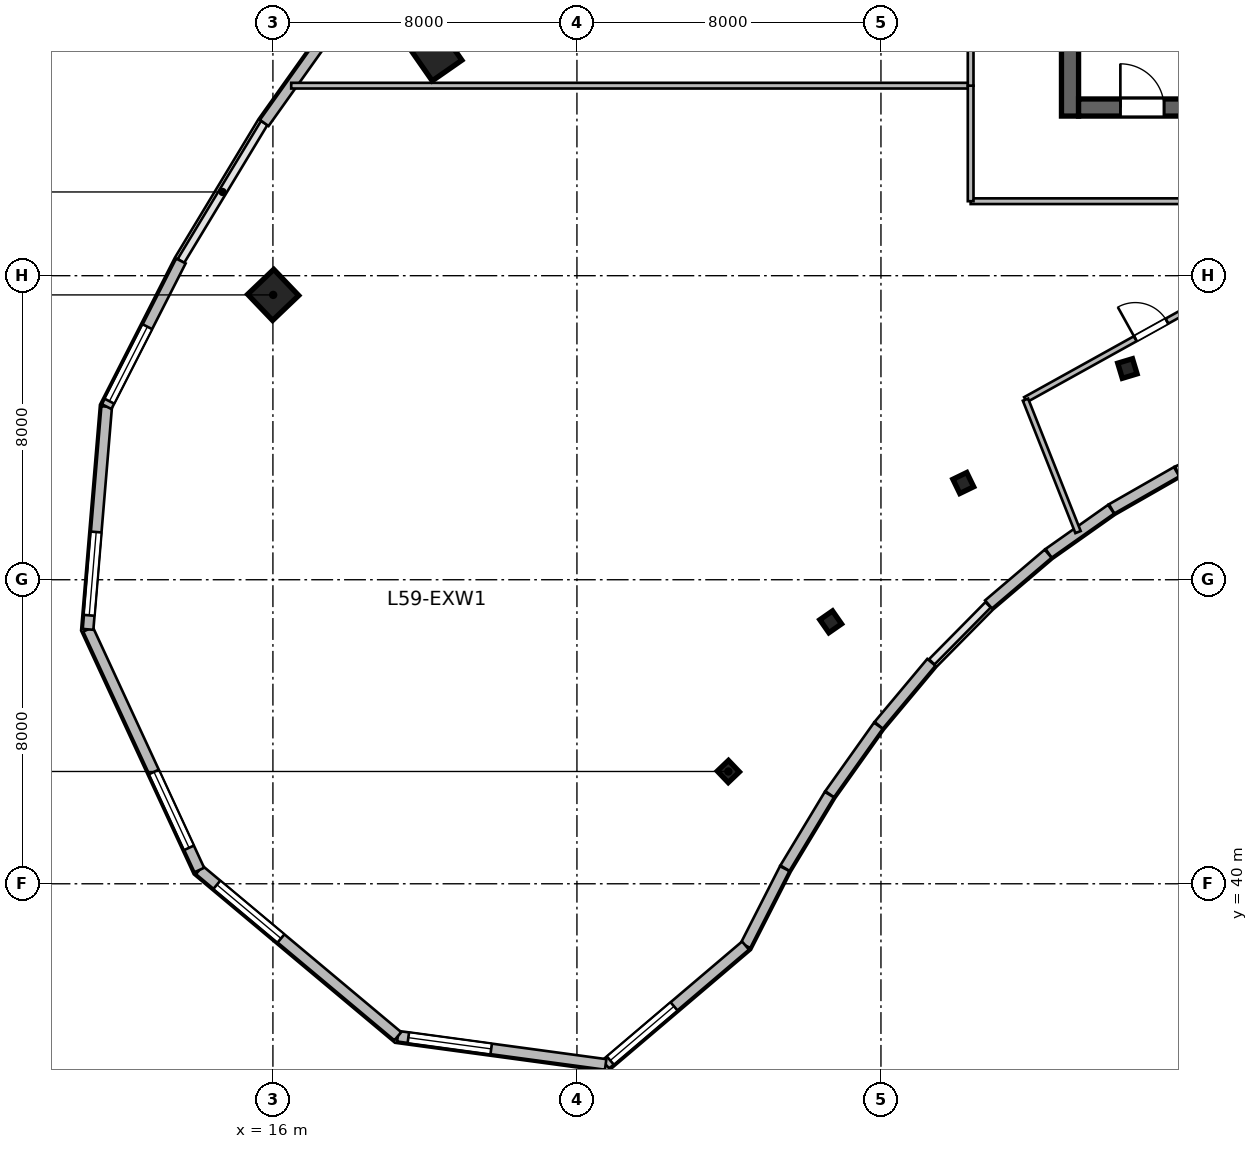
"""IFC4 building model, lengths in metres.
Left out: names, types, materials, properties, quantities, classifications, styles, units other than length and angle.
Written with IfcOpenShell. Run it as: python <this file> out.ifc"""

import sys

from ifc_helpers import new_model, si_unit, direction, frame, frame_2d, origin, origin_2d, place, context, subcontext, project, spatial, rectangle, i_section, extrude, source, transform, mapped, element, fill, save


model = new_model("IFC4")
c1 = context("Model", 3, precision=1e-05, world=origin(), true_north=direction((0.0, 1.0)))
c2 = subcontext(c1, "Body", "Model", "MODEL_VIEW")
j1 = project(units=[si_unit("LENGTHUNIT", "METRE"), si_unit("PLANEANGLEUNIT", "RADIAN")], contexts=[c1])
p1 = place(None, origin())
s1 = spatial("IfcSite", under=j1, at=p1, CompositionType="ELEMENT")
p2 = place(p1, origin())
s2 = spatial("IfcBuilding", under=s1, at=p2, CompositionType="ELEMENT")
p3 = place(p2, frame((0.0, 0.0, 243.0)))
s3 = spatial("IfcBuildingStorey", under=s2, at=p3, CompositionType="ELEMENT", Elevation=243.0)
m1 = source(origin(), c2, "Body", "SweptSolid", [
    extrude(rectangle(XDim=12.0, YDim=0.45, at=frame_2d((6.0, 0.0))), origin(), (0.0, 0.0, 1.0), 3.9),
])
p4 = place(p3, frame((36.975, 60.2, 0.0), z_axis=(0.0, 0.0, 1.0), x_axis=(0.0, 1.0, 0.0)))
e1 = element("IfcWall", 1, at=p4, inside=s3, PredefinedType="SHEAR", context=c2, shape_type="MappedRepresentation", body=[
    mapped(m1, transform((0.0, 0.0, 0.0), scale=1.0)),
])
m2 = source(origin(), c2, "Body", "SweptSolid", [
    extrude(rectangle(XDim=21.6, YDim=0.45, at=frame_2d((10.8, 0.0))), origin(), (0.0, 0.0, 1.0), 3.9),
])
p5 = place(p3, frame((37.2, 60.425, 0.0), z_axis=(0.0, 0.0, 1.0), x_axis=(1.0, 0.0, 0.0)))
e2 = element("IfcWall", 2, at=p5, inside=s3, PredefinedType="SHEAR", context=c2, shape_type="MappedRepresentation", body=[
    mapped(m2, transform((0.0, 0.0, 0.0), scale=1.0)),
])
p6 = place(p5, frame((1.1, 0.0, 0.0)))
e3 = element("IfcOpeningElement", 3, at=p6, cuts=e2, PredefinedType="OPENING", context=c2, shape_type="SweptSolid", body=[
    extrude(rectangle(XDim=1.15, YDim=2.15, at=frame_2d((0.575, 1.075))), frame((0.0, 0.235, 0.0), z_axis=(0.0, -1.0, 0.0), x_axis=(1.0, 0.0, 0.0)), (0.0, 0.0, 1.0), 0.47),
])
p7 = place(p5, frame((19.5, 0.0, 0.0)))
e4 = element("IfcOpeningElement", 4, at=p7, cuts=e2, PredefinedType="OPENING", context=c2, shape_type="SweptSolid", body=[
    extrude(rectangle(XDim=0.9, YDim=2.1, at=frame_2d((0.45, 1.05))), frame((0.0, 0.235, 0.0), z_axis=(0.0, -1.0, 0.0), x_axis=(1.0, 0.0, 0.0)), (0.0, 0.0, 1.0), 0.47),
])
p8 = place(p5, frame((12.02, 0.0, 0.0)))
e5 = element("IfcOpeningElement", 5, at=p8, cuts=e2, PredefinedType="OPENING", context=c2, shape_type="SweptSolid", body=[
    extrude(rectangle(XDim=1.6, YDim=2.15, at=frame_2d((0.8, 1.075))), frame((0.0, 0.235, 0.0), z_axis=(0.0, -1.0, 0.0), x_axis=(1.0, 0.0, 0.0)), (0.0, 0.0, 1.0), 0.47),
])
m3 = source(origin(), c2, "Body", "SweptSolid", [
    extrude(i_section(OverallWidth=0.406, OverallDepth=0.416, WebThickness=0.03, FlangeThickness=0.048, at=origin_2d()), origin(), (0.0, 0.0, 1.0), 3.9),
])
p9 = place(p3, frame((27.985, 42.955, 0.0), z_axis=(0.0, 0.0, 1.0), x_axis=(-0.690756218984, 0.723087716626, 0.0)))
e6 = element("IfcColumn", 6, at=p9, inside=s3, PredefinedType="COLUMN", context=c2, shape_type="MappedRepresentation", body=[
    mapped(m3, transform((0.0, 0.0, 0.0), scale=1.0)),
])
m4 = source(origin(), c2, "Body", "SweptSolid", [
    extrude(rectangle(XDim=0.95, YDim=0.95, at=origin_2d()), origin(), (0.0, 0.0, 1.0), 3.9),
])
p10 = place(p3, frame((16.007, 55.494, 0.0), z_axis=(0.0, 0.0, 1.0), x_axis=(-0.690756218984, 0.723087716626, 0.0)))
e7 = element("IfcColumn", 7, at=p10, inside=s3, PredefinedType="COLUMN", context=c2, shape_type="MappedRepresentation", body=[
    mapped(m4, transform((0.0, 0.0, 0.0), scale=1.0)),
])
p11 = place(p3, frame((30.677, 46.892, 0.0), z_axis=(0.0, 0.0, 1.0), x_axis=(-0.571143442153, 0.820850271661, 0.0)))
e8 = element("IfcColumn", 8, at=p11, inside=s3, PredefinedType="COLUMN", context=c2, shape_type="MappedRepresentation", body=[
    mapped(m3, transform((0.0, 0.0, 0.0), scale=1.0)),
])
p12 = place(p3, frame((20.311, 61.789, 0.0), z_axis=(0.0, 0.0, 1.0), x_axis=(-0.571143442153, 0.820850271661, 0.0)))
e9 = element("IfcColumn", 9, at=p12, inside=s3, PredefinedType="COLUMN", context=c2, shape_type="MappedRepresentation", body=[
    mapped(m4, transform((0.0, 0.0, 0.0), scale=1.0)),
])
for number, where, z_axis, x_axis in (
    (10, (34.166, 50.545, 0.0), (0.0, 0.0, 1.0), (-0.436, 0.9, 0.0)),
    (11, (38.485, 53.558, 0.0), (0.0, 0.0, 1.0), (-0.289, 0.957, 0.0)),
):
    element("IfcColumn", number, at=place(p3, frame(where, z_axis=z_axis, x_axis=x_axis)), inside=s3, PredefinedType="COLUMN", context=c2, shape_type="MappedRepresentation", body=[
        mapped(m3, transform((0.0, 0.0, 0.0), scale=1.0)),
    ])
m5 = source(origin(), c2, "Body", "SweptSolid", [
    extrude(rectangle(XDim=1.931, YDim=0.28, at=frame_2d((0.965, 0.0))), origin(), (0.0, 0.0, 1.0), 3.65),
])
p13 = place(p3, frame((41.557, 51.639, 0.0), z_axis=(0.0, 0.0, 1.0), x_axis=(-0.912681759743, -0.408671023481, 0.0)))
e12 = element("IfcWall", 12, at=p13, inside=s3, PredefinedType="SOLIDWALL", context=c2, shape_type="MappedRepresentation", body=[
    mapped(m5, transform((0.0, 0.0, 0.0), scale=1.0)),
])
m6 = source(origin(), c2, "Body", "SweptSolid", [
    extrude(rectangle(XDim=1.969, YDim=0.28, at=frame_2d((0.984, 0.0))), origin(), (0.0, 0.0, 1.0), 3.65),
])
p14 = place(p3, frame((39.779, 50.842, 0.0), z_axis=(0.0, 0.0, 1.0), x_axis=(-0.86797594681, -0.496606238139, 0.0)))
e13 = element("IfcWall", 13, at=p14, inside=s3, PredefinedType="SOLIDWALL", context=c2, shape_type="MappedRepresentation", body=[
    mapped(m6, transform((0.0, 0.0, 0.0), scale=1.0)),
])
m7 = source(origin(), c2, "Body", "SweptSolid", [
    extrude(rectangle(XDim=2.012, YDim=0.28, at=frame_2d((1.006, 0.0))), origin(), (0.0, 0.0, 1.0), 3.65),
])
p15 = place(p3, frame((38.055, 49.855, 0.0), z_axis=(0.0, 0.0, 1.0), x_axis=(-0.817008215805, -0.576626027255, 0.0)))
e14 = element("IfcWall", 14, at=p15, inside=s3, PredefinedType="SOLIDWALL", context=c2, shape_type="MappedRepresentation", body=[
    mapped(m7, transform((0.0, 0.0, 0.0), scale=1.0)),
])
m8 = source(origin(), c2, "Body", "SweptSolid", [
    extrude(rectangle(XDim=2.06, YDim=0.28, at=frame_2d((1.03, 0.0))), origin(), (0.0, 0.0, 1.0), 3.65),
])
p16 = place(p3, frame((36.399, 48.685, 0.0), z_axis=(0.0, 0.0, 1.0), x_axis=(-0.761494573969, -0.648171284319, 0.0)))
e15 = element("IfcWall", 15, at=p16, inside=s3, PredefinedType="SOLIDWALL", context=c2, shape_type="MappedRepresentation", body=[
    mapped(m8, transform((0.0, 0.0, 0.0), scale=1.0)),
])
m9 = source(origin(), c2, "Body", "SweptSolid", [
    extrude(rectangle(XDim=2.161, YDim=0.28, at=frame_2d((1.08, 0.0))), origin(), (0.0, 0.0, 1.0), 3.65),
])
p17 = place(p3, frame((33.327, 45.828, 0.0), z_axis=(0.0, 0.0, 1.0), x_axis=(-0.641794516235, -0.766876651705, 0.0)))
e16 = element("IfcWall", 16, at=p17, inside=s3, PredefinedType="SOLIDWALL", context=c2, shape_type="MappedRepresentation", body=[
    mapped(m9, transform((0.0, 0.0, 0.0), scale=1.0)),
])
m10 = source(origin(), c2, "Body", "SweptSolid", [
    extrude(rectangle(XDim=2.212, YDim=0.28, at=frame_2d((1.106, 0.0))), origin(), (0.0, 0.0, 1.0), 3.65),
])
p18 = place(p3, frame((31.931, 44.159, 0.0), z_axis=(0.0, 0.0, 1.0), x_axis=(-0.579639452819, -0.814873060504, 0.0)))
e17 = element("IfcWall", 17, at=p18, inside=s3, PredefinedType="SOLIDWALL", context=c2, shape_type="MappedRepresentation", body=[
    mapped(m10, transform((0.0, 0.0, 0.0), scale=1.0)),
])
m11 = source(origin(), c2, "Body", "SweptSolid", [
    extrude(rectangle(XDim=2.261, YDim=0.28, at=frame_2d((1.13, 0.0))), origin(), (0.0, 0.0, 1.0), 3.65),
])
p19 = place(p3, frame((30.642, 42.346, 0.0), z_axis=(0.0, 0.0, 1.0), x_axis=(-0.516891494538, -0.856050923062, 0.0)))
e18 = element("IfcWall", 18, at=p19, inside=s3, PredefinedType="SOLIDWALL", context=c2, shape_type="MappedRepresentation", body=[
    mapped(m11, transform((0.0, 0.0, 0.0), scale=1.0)),
])
m12 = source(origin(), c2, "Body", "SweptSolid", [
    extrude(rectangle(XDim=2.271, YDim=0.28, at=frame_2d((1.136, 0.0))), origin(), (0.0, 0.0, 1.0), 3.65),
])
p20 = place(p3, frame((29.467, 40.399, 0.0), z_axis=(0.0, 0.0, 1.0), x_axis=(-0.453993402883, -0.891005044957, 0.0)))
e19 = element("IfcWall", 19, at=p20, inside=s3, PredefinedType="SOLIDWALL", context=c2, shape_type="MappedRepresentation", body=[
    mapped(m12, transform((0.0, 0.0, 0.0), scale=1.0)),
])
m13 = source(origin(), c2, "Body", "SweptSolid", [
    extrude(rectangle(XDim=4.83, YDim=0.28, at=frame_2d((2.415, 0.0))), origin(), (0.0, 0.0, 1.0), 3.65),
])
p21 = place(p3, frame((28.436, 38.375, 0.0), z_axis=(0.0, 0.0, 1.0), x_axis=(-0.761890676316, -0.647705640968, 0.0)))
e20 = element("IfcWall", 20, at=p21, inside=s3, PredefinedType="SOLIDWALL", context=c2, shape_type="MappedRepresentation", body=[
    mapped(m13, transform((0.0, 0.0, 0.0), scale=1.0)),
])
p22 = place(p21, frame((2.47, 0.0, 0.95)))
e21 = element("IfcOpeningElement", 21, at=p22, cuts=e20, PredefinedType="OPENING", context=c2, shape_type="SweptSolid", body=[
    extrude(rectangle(XDim=2.2, YDim=2.1, at=frame_2d((1.1, 1.05))), frame((0.0, 0.15, 0.0), z_axis=(0.0, -1.0, 0.0), x_axis=(1.0, 0.0, 0.0)), (0.0, 0.0, 1.0), 0.3),
])
m14 = source(origin(), c2, "Body", "SweptSolid", [
    extrude(rectangle(XDim=5.52, YDim=0.28, at=frame_2d((2.76, 0.0))), origin(), (0.0, 0.0, 1.0), 3.65),
])
p23 = place(p3, frame((24.756, 35.247, 0.0), z_axis=(0.0, 0.0, 1.0), x_axis=(-0.99093029136, 0.134376923856, 0.0)))
e22 = element("IfcWall", 22, at=p23, inside=s3, PredefinedType="SOLIDWALL", context=c2, shape_type="MappedRepresentation", body=[
    mapped(m14, transform((0.0, 0.0, 0.0), scale=1.0)),
])
p24 = place(p23, frame((3.04, 0.0, 0.95)))
e23 = element("IfcOpeningElement", 23, at=p24, cuts=e22, PredefinedType="OPENING", context=c2, shape_type="SweptSolid", body=[
    extrude(rectangle(XDim=2.2, YDim=2.1, at=frame_2d((1.1, 1.05))), frame((0.0, 0.15, 0.0), z_axis=(0.0, -1.0, 0.0), x_axis=(1.0, 0.0, 0.0)), (0.0, 0.0, 1.0), 0.3),
])
m15 = source(origin(), c2, "Body", "SweptSolid", [
    extrude(rectangle(XDim=6.812, YDim=0.28, at=frame_2d((3.406, 0.0))), origin(), (0.0, 0.0, 1.0), 3.65),
])
p25 = place(p3, frame((19.286, 35.988, 0.0), z_axis=(0.0, 0.0, 1.0), x_axis=(-0.766712133953, 0.641991046394, 0.0)))
e24 = element("IfcWall", 24, at=p25, inside=s3, PredefinedType="SOLIDWALL", context=c2, shape_type="MappedRepresentation", body=[
    mapped(m15, transform((0.0, 0.0, 0.0), scale=1.0)),
])
p26 = place(p25, frame((4.009, 0.0, 0.95)))
e25 = element("IfcOpeningElement", 25, at=p26, cuts=e24, PredefinedType="OPENING", context=c2, shape_type="SweptSolid", body=[
    extrude(rectangle(XDim=2.2, YDim=2.1, at=frame_2d((1.1, 1.05))), frame((0.0, 0.15, 0.0), z_axis=(0.0, -1.0, 0.0), x_axis=(1.0, 0.0, 0.0)), (0.0, 0.0, 1.0), 0.3),
])
m16 = source(origin(), c2, "Body", "SweptSolid", [
    extrude(rectangle(XDim=6.977, YDim=0.28, at=frame_2d((3.488, 0.0))), origin(), (0.0, 0.0, 1.0), 3.65),
])
p27 = place(p3, frame((14.063, 40.362, 0.0), z_axis=(0.0, 0.0, 1.0), x_axis=(-0.41966832263, 0.907677530283, 0.0)))
e26 = element("IfcWall", 26, at=p27, inside=s3, PredefinedType="SOLIDWALL", context=c2, shape_type="MappedRepresentation", body=[
    mapped(m16, transform((0.0, 0.0, 0.0), scale=1.0)),
])
p28 = place(p27, frame((0.644, 0.0, 0.95)))
e27 = element("IfcOpeningElement", 27, at=p28, cuts=e26, PredefinedType="OPENING", context=c2, shape_type="SweptSolid", body=[
    extrude(rectangle(XDim=2.2, YDim=2.1, at=frame_2d((1.1, 1.05))), frame((0.0, 0.15, 0.0), z_axis=(0.0, -1.0, 0.0), x_axis=(1.0, 0.0, 0.0)), (0.0, 0.0, 1.0), 0.3),
])
m17 = source(origin(), c2, "Body", "SweptSolid", [
    extrude(rectangle(XDim=5.881, YDim=0.28, at=frame_2d((2.94, 0.0))), origin(), (0.0, 0.0, 1.0), 3.65),
])
p29 = place(p3, frame((11.135, 46.694, 0.0), z_axis=(0.0, 0.0, 1.0), x_axis=(0.083320333731, 0.996522815588, 0.0)))
e28 = element("IfcWall", 28, at=p29, inside=s3, PredefinedType="SOLIDWALL", context=c2, shape_type="MappedRepresentation", body=[
    mapped(m17, transform((0.0, 0.0, 0.0), scale=1.0)),
])
p30 = place(p29, frame((0.37, 0.0, 0.95)))
e29 = element("IfcOpeningElement", 29, at=p30, cuts=e28, PredefinedType="OPENING", context=c2, shape_type="SweptSolid", body=[
    extrude(rectangle(XDim=2.2, YDim=2.1, at=frame_2d((1.1, 1.05))), frame((0.0, 0.15, 0.0), z_axis=(0.0, -1.0, 0.0), x_axis=(1.0, 0.0, 0.0)), (0.0, 0.0, 1.0), 0.3),
])
m18 = source(origin(), c2, "Body", "SweptSolid", [
    extrude(rectangle(XDim=4.301, YDim=0.28, at=frame_2d((2.151, 0.0))), origin(), (0.0, 0.0, 1.0), 3.65),
])
p31 = place(p3, frame((11.625, 52.555, 0.0), z_axis=(0.0, 0.0, 1.0), x_axis=(0.454011655096, 0.89099574468, 0.0)))
e30 = element("IfcWall", 30, at=p31, inside=s3, PredefinedType="SOLIDWALL", context=c2, shape_type="MappedRepresentation", body=[
    mapped(m18, transform((0.0, 0.0, 0.0), scale=1.0)),
])
p32 = place(p31, frame((0.16, 0.0, 0.95)))
e31 = element("IfcOpeningElement", 31, at=p32, cuts=e30, PredefinedType="OPENING", context=c2, shape_type="SweptSolid", body=[
    extrude(rectangle(XDim=2.2, YDim=2.1, at=frame_2d((1.1, 1.05))), frame((0.0, 0.15, 0.0), z_axis=(0.0, -1.0, 0.0), x_axis=(1.0, 0.0, 0.0)), (0.0, 0.0, 1.0), 0.3),
])
m19 = source(origin(), c2, "Body", "SweptSolid", [
    extrude(rectangle(XDim=4.149, YDim=0.28, at=frame_2d((2.074, 0.0))), origin(), (0.0, 0.0, 1.0), 3.65),
])
p33 = place(p3, frame((15.771, 60.019, 0.0), z_axis=(0.0, 0.0, 1.0), x_axis=(0.579622789827, 0.814884913048, 0.0)))
e32 = element("IfcWall", 32, at=p33, inside=s3, PredefinedType="SOLIDWALL", context=c2, shape_type="MappedRepresentation", body=[
    mapped(m19, transform((0.0, 0.0, 0.0), scale=1.0)),
])
m20 = source(origin(), c2, "Body", "SweptSolid", [
    extrude(rectangle(XDim=5.262, YDim=0.15, at=frame_2d((2.631, 0.0))), origin(), (0.0, 0.0, 1.0), 3.65),
])
p34 = place(p3, frame((35.803, 52.738, 0.0), z_axis=(0.0, 0.0, 1.0), x_axis=(0.874365088288, 0.485268680612, 0.0)))
e33 = element("IfcWall", 33, at=p34, inside=s3, PredefinedType="PARTITIONING", context=c2, shape_type="MappedRepresentation", body=[
    mapped(m20, transform((0.0, 0.0, 0.0), scale=1.0)),
])
p35 = place(p34, frame((3.306, 0.0, 0.0)))
e34 = element("IfcOpeningElement", 34, at=p35, cuts=e33, PredefinedType="OPENING", context=c2, shape_type="SweptSolid", body=[
    extrude(rectangle(XDim=0.95, YDim=2.1, at=frame_2d((0.475, 1.05))), frame((0.0, 0.085, 0.0), z_axis=(0.0, -1.0, 0.0), x_axis=(1.0, 0.0, 0.0)), (0.0, 0.0, 1.0), 0.17),
])
m21 = source(origin(), c2, "Body", "SweptSolid", [
    extrude(rectangle(XDim=3.749, YDim=0.15, at=frame_2d((1.875, 0.0))), origin(), (0.0, 0.0, 1.0), 3.65),
])
p36 = place(p3, frame((37.186, 49.254, 0.0), z_axis=(0.0, 0.0, 1.0), x_axis=(-0.368851771682, 0.92948823044, 0.0)))
e35 = element("IfcWall", 35, at=p36, inside=s3, PredefinedType="PARTITIONING", context=c2, shape_type="MappedRepresentation", body=[
    mapped(m21, transform((0.0, 0.0, 0.0), scale=1.0)),
])
m22 = source(origin(), c2, "Body", "SweptSolid", [
    extrude(rectangle(XDim=12.39, YDim=0.15, at=frame_2d((6.195, 0.0))), origin(), (0.0, 0.0, 1.0), 3.65),
])
p37 = place(p3, frame((34.36, 57.96, 0.0), z_axis=(0.0, 0.0, 1.0), x_axis=(1.0, 0.0, 0.0)))
e36 = element("IfcWall", 36, at=p37, inside=s3, PredefinedType="PARTITIONING", context=c2, shape_type="MappedRepresentation", body=[
    mapped(m22, transform((0.0, 0.0, 0.0), scale=1.0)),
])
m23 = source(origin(), c2, "Body", "SweptSolid", [
    extrude(rectangle(XDim=17.879, YDim=0.15, at=frame_2d((8.939, 0.0))), origin(), (0.0, 0.0, 1.0), 3.65),
])
p38 = place(p3, frame((16.481, 61.0, 0.0), z_axis=(0.0, 0.0, 1.0), x_axis=(1.0, 0.0, 0.0)))
e37 = element("IfcWall", 37, at=p38, inside=s3, PredefinedType="PARTITIONING", context=c2, shape_type="MappedRepresentation", body=[
    mapped(m23, transform((0.0, 0.0, 0.0), scale=1.0)),
])
m24 = source(origin(), c2, "Body", "SweptSolid", [
    extrude(rectangle(XDim=3.04, YDim=0.15, at=frame_2d((1.52, 0.0))), origin(), (0.0, 0.0, 1.0), 3.65),
])
p39 = place(p3, frame((34.36, 57.96, 0.0), z_axis=(0.0, 0.0, 1.0), x_axis=(0.0, 1.0, 0.0)))
e38 = element("IfcWall", 38, at=p39, inside=s3, PredefinedType="PARTITIONING", context=c2, shape_type="MappedRepresentation", body=[
    mapped(m24, transform((0.0, 0.0, 0.0), scale=1.0)),
])
m25 = source(origin(), c2, "Body", "SweptSolid", [
    extrude(rectangle(XDim=3.2, YDim=0.15, at=frame_2d((1.6, 0.0))), origin(), (0.0, 0.0, 1.0), 3.65),
])
p40 = place(p3, frame((34.36, 61.0, 0.0), z_axis=(0.0, 0.0, 1.0), x_axis=(0.0, 1.0, 0.0)))
e39 = element("IfcWall", 39, at=p40, inside=s3, PredefinedType="PARTITIONING", context=c2, shape_type="MappedRepresentation", body=[
    mapped(m25, transform((0.0, 0.0, 0.0), scale=1.0)),
])
p41 = place(p40, frame((1.125, 0.0, 0.0)))
e40 = element("IfcOpeningElement", 40, at=p41, cuts=e39, PredefinedType="OPENING", context=c2, shape_type="SweptSolid", body=[
    extrude(rectangle(XDim=0.95, YDim=2.1, at=frame_2d((0.475, 1.05))), frame((0.0, 0.085, 0.0), z_axis=(0.0, -1.0, 0.0), x_axis=(1.0, 0.0, 0.0)), (0.0, 0.0, 1.0), 0.17),
])
m26 = source(origin(), c2, "Body", "SweptSolid", [
    extrude(rectangle(XDim=2.2, YDim=2.1, at=frame_2d((1.1, 1.05))), frame((0.0, 0.03, 0.0), z_axis=(0.0, -1.0, 0.0), x_axis=(1.0, 0.0, 0.0)), (0.0, 0.0, 1.0), 0.06),
])
p42 = place(p22, origin())
e41 = element("IfcWindow", 41, at=p42, inside=s3, PartitioningType="TRIPLE_PANEL_VERTICAL", PredefinedType="WINDOW", context=c2, shape_type="MappedRepresentation", body=[
    mapped(m26, transform((0.0, 0.0, 0.0), scale=1.0)),
])
fill(e21, e41)
p43 = place(p24, origin())
e42 = element("IfcWindow", 42, at=p43, inside=s3, PartitioningType="TRIPLE_PANEL_VERTICAL", PredefinedType="WINDOW", context=c2, shape_type="MappedRepresentation", body=[
    mapped(m26, transform((0.0, 0.0, 0.0), scale=1.0)),
])
fill(e23, e42)
p44 = place(p26, origin())
e43 = element("IfcWindow", 43, at=p44, inside=s3, PartitioningType="TRIPLE_PANEL_VERTICAL", PredefinedType="WINDOW", context=c2, shape_type="MappedRepresentation", body=[
    mapped(m26, transform((0.0, 0.0, 0.0), scale=1.0)),
])
fill(e25, e43)
p45 = place(p28, origin())
e44 = element("IfcWindow", 44, at=p45, inside=s3, PartitioningType="TRIPLE_PANEL_VERTICAL", PredefinedType="WINDOW", context=c2, shape_type="MappedRepresentation", body=[
    mapped(m26, transform((0.0, 0.0, 0.0), scale=1.0)),
])
fill(e27, e44)
p46 = place(p30, origin())
e45 = element("IfcWindow", 45, at=p46, inside=s3, PartitioningType="TRIPLE_PANEL_VERTICAL", PredefinedType="WINDOW", context=c2, shape_type="MappedRepresentation", body=[
    mapped(m26, transform((0.0, 0.0, 0.0), scale=1.0)),
])
fill(e29, e45)
p47 = place(p32, origin())
e46 = element("IfcWindow", 46, at=p47, inside=s3, PartitioningType="TRIPLE_PANEL_VERTICAL", PredefinedType="WINDOW", context=c2, shape_type="MappedRepresentation", body=[
    mapped(m26, transform((0.0, 0.0, 0.0), scale=1.0)),
])
fill(e31, e46)
m27 = source(origin(), c2, "Body", "SweptSolid", [
    extrude(rectangle(XDim=1.15, YDim=2.15, at=frame_2d((0.575, 1.075))), frame((0.0, 0.025, 0.0), z_axis=(0.0, -1.0, 0.0), x_axis=(1.0, 0.0, 0.0)), (0.0, 0.0, 1.0), 0.05),
])
p48 = place(p6, origin())
e47 = element("IfcDoor", 47, at=p48, inside=s3, OperationType="SINGLE_SWING_LEFT", PredefinedType="DOOR", context=c2, shape_type="MappedRepresentation", body=[
    mapped(m27, transform((0.0, 0.0, 0.0), scale=1.0)),
])
fill(e3, e47)
m28 = source(origin(), c2, "Body", "SweptSolid", [
    extrude(rectangle(XDim=0.95, YDim=2.1, at=frame_2d((0.475, 1.05))), frame((0.0, 0.025, 0.0), z_axis=(0.0, -1.0, 0.0), x_axis=(1.0, 0.0, 0.0)), (0.0, 0.0, 1.0), 0.05),
])
p49 = place(p35, origin())
e48 = element("IfcDoor", 48, at=p49, inside=s3, OperationType="SINGLE_SWING_LEFT", PredefinedType="DOOR", context=c2, shape_type="MappedRepresentation", body=[
    mapped(m28, transform((0.0, 0.0, 0.0), scale=1.0)),
])
fill(e34, e48)
save(model, sys.argv[1])
